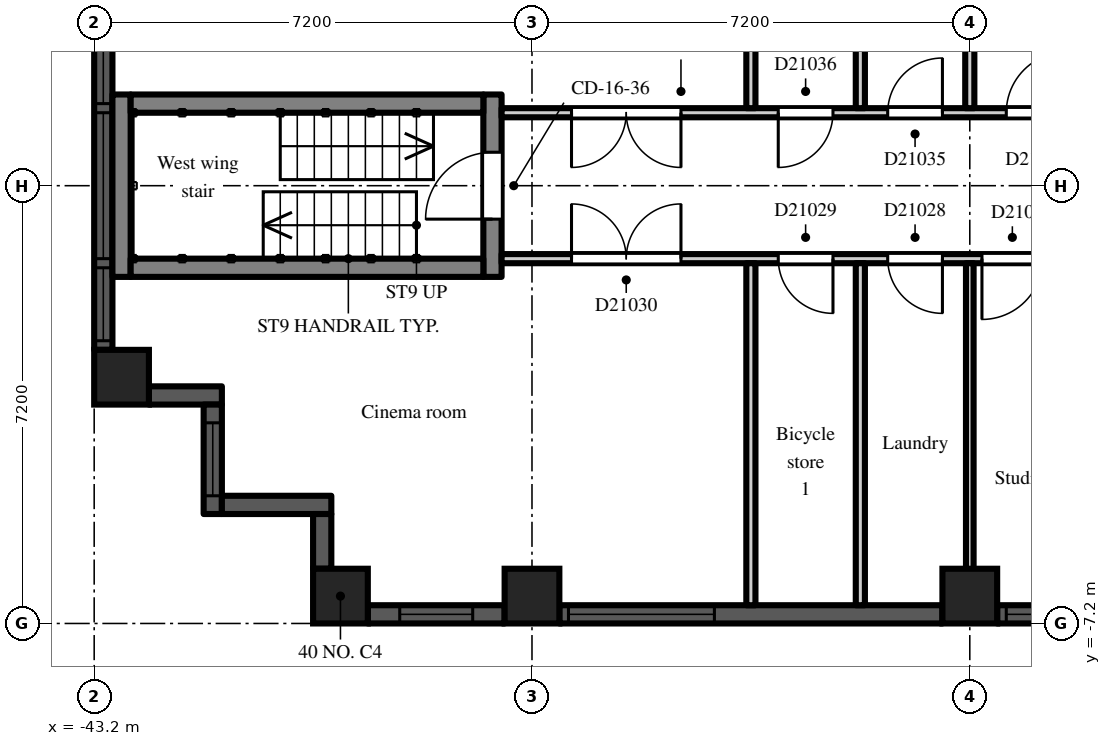
"""IFC4 building model, lengths in metres.
Left out: names, types, materials, properties, quantities, classifications, styles, units other than length and angle.
Written with IfcOpenShell. Run it as: python <this file> out.ifc"""

import sys

from ifc_helpers import new_model, si_unit, direction, frame, frame_2d, origin, origin_2d, place, context, subcontext, project, spatial, rectangle, extrude, element, fill, save


model = new_model("IFC4")
c1 = context("Model", 3, precision=1e-05, world=origin(), true_north=direction((0.0, 1.0)))
c2 = subcontext(c1, "Body", "Model", "MODEL_VIEW")
j1 = project(units=[si_unit("LENGTHUNIT", "METRE"), si_unit("PLANEANGLEUNIT", "RADIAN")], contexts=[c1])
p1 = place(None, origin())
s1 = spatial("IfcSite", under=j1, at=p1, CompositionType="ELEMENT")
p2 = place(p1, origin())
s2 = spatial("IfcBuilding", under=s1, at=p2, CompositionType="ELEMENT")
p3 = place(p2, frame((0.0, 0.0, 147.3)))
s3 = spatial("IfcBuildingStorey", under=s2, at=p3, CompositionType="ELEMENT", Elevation=147.3)
for number, where, z_axis, x_axis in (
    (1, (-42.75, -3.15, 0.0), (0.0, 0.0, 1.0), (1.0, 0.0, 0.0)),
    (2, (-39.15, -6.75, 0.0), (0.0, 0.0, 1.0), (1.0, 0.0, 0.0)),
    (3, (-36.0, -6.75, 0.0), (0.0, 0.0, 1.0), (1.0, 0.0, 0.0)),
    (4, (-28.8, -6.75, 0.0), (0.0, 0.0, 1.0), (1.0, 0.0, 0.0)),
):
    element("IfcColumn", number, at=place(p3, frame(where, z_axis=z_axis, x_axis=x_axis)), inside=s3, PredefinedType="COLUMN", context=c2, shape_type="SweptSolid", body=[
        extrude(rectangle(XDim=0.9, YDim=0.9, at=origin_2d()), origin(), (0.0, 0.0, 1.0), 3.0),
    ])
p4 = place(p3, frame((-43.05, 2.7, 0.0), z_axis=(0.0, 0.0, 1.0), x_axis=(0.0, -1.0, 0.0)))
e5 = element("IfcWall", 5, at=p4, inside=s3, PredefinedType="SOLIDWALL", context=c2, shape_type="SweptSolid", body=[
    extrude(rectangle(XDim=5.4, YDim=0.3, at=frame_2d((2.7, 0.0))), origin(), (0.0, 0.0, 1.0), 2.2),
])
p5 = place(p4, frame((1.5, 0.0, 0.2)))
e6 = element("IfcOpeningElement", 6, at=p5, cuts=e5, PredefinedType="OPENING", context=c2, shape_type="SweptSolid", body=[
    extrude(rectangle(XDim=2.4, YDim=1.85, at=frame_2d((1.2, 0.925))), frame((0.0, 0.16, 0.0), z_axis=(0.0, -1.0, 0.0), x_axis=(1.0, 0.0, 0.0)), (0.0, 0.0, 1.0), 0.32),
])
p6 = place(p4, frame((0.15, 0.0, 0.2)))
e7 = element("IfcOpeningElement", 7, at=p6, cuts=e5, PredefinedType="OPENING", context=c2, shape_type="SweptSolid", body=[
    extrude(rectangle(XDim=1.2, YDim=1.85, at=frame_2d((0.6, 0.925))), frame((0.0, 0.16, 0.0), z_axis=(0.0, -1.0, 0.0), x_axis=(1.0, 0.0, 0.0)), (0.0, 0.0, 1.0), 0.32),
])
p7 = place(p4, frame((4.05, 0.0, 0.2)))
e8 = element("IfcOpeningElement", 8, at=p7, cuts=e5, PredefinedType="OPENING", context=c2, shape_type="SweptSolid", body=[
    extrude(rectangle(XDim=1.2, YDim=1.85, at=frame_2d((0.6, 0.925))), frame((0.0, 0.16, 0.0), z_axis=(0.0, -1.0, 0.0), x_axis=(1.0, 0.0, 0.0)), (0.0, 0.0, 1.0), 0.32),
])
p8 = place(p3, frame((-42.3, -3.45, 0.0), z_axis=(0.0, 0.0, 1.0), x_axis=(1.0, 0.0, 0.0)))
e9 = element("IfcWall", 9, at=p8, inside=s3, PredefinedType="SOLIDWALL", context=c2, shape_type="SweptSolid", body=[
    extrude(rectangle(XDim=1.2, YDim=0.3, at=frame_2d((0.6, 0.0))), origin(), (0.0, 0.0, 1.0), 2.6),
])
p9 = place(p3, frame((-41.25, -3.6, 0.0), z_axis=(0.0, 0.0, 1.0), x_axis=(0.0, -1.0, 0.0)))
e10 = element("IfcWall", 10, at=p9, inside=s3, PredefinedType="SOLIDWALL", context=c2, shape_type="SweptSolid", body=[
    extrude(rectangle(XDim=1.8, YDim=0.3, at=frame_2d((0.9, 0.0))), origin(), (0.0, 0.0, 1.0), 2.6),
])
p10 = place(p9, frame((0.3, 0.0, 0.2)))
e11 = element("IfcOpeningElement", 11, at=p10, cuts=e10, PredefinedType="OPENING", context=c2, shape_type="SweptSolid", body=[
    extrude(rectangle(XDim=1.2, YDim=1.85, at=frame_2d((0.6, 0.925))), frame((0.0, 0.16, 0.0), z_axis=(0.0, -1.0, 0.0), x_axis=(1.0, 0.0, 0.0)), (0.0, 0.0, 1.0), 0.32),
])
p11 = place(p3, frame((-41.1, -5.25, 0.0), z_axis=(0.0, 0.0, 1.0), x_axis=(1.0, 0.0, 0.0)))
e12 = element("IfcWall", 12, at=p11, inside=s3, PredefinedType="SOLIDWALL", context=c2, shape_type="SweptSolid", body=[
    extrude(rectangle(XDim=1.8, YDim=0.3, at=frame_2d((0.9, 0.0))), origin(), (0.0, 0.0, 1.0), 2.6),
])
p12 = place(p3, frame((-39.45, -5.4, 0.0), z_axis=(0.0, 0.0, 1.0), x_axis=(0.0, -1.0, 0.0)))
e13 = element("IfcWall", 13, at=p12, inside=s3, PredefinedType="SOLIDWALL", context=c2, shape_type="SweptSolid", body=[
    extrude(rectangle(XDim=0.9, YDim=0.3, at=frame_2d((0.45, 0.0))), origin(), (0.0, 0.0, 1.0), 2.6),
])
p13 = place(p3, frame((-38.7, -7.05, 0.0), z_axis=(0.0, 0.0, 1.0), x_axis=(1.0, 0.0, 0.0)))
e14 = element("IfcWall", 14, at=p13, inside=s3, PredefinedType="SOLIDWALL", context=c2, shape_type="SweptSolid", body=[
    extrude(rectangle(XDim=2.25, YDim=0.3, at=frame_2d((1.125, 0.0))), origin(), (0.0, 0.0, 1.0), 2.2),
])
p14 = place(p13, frame((0.525, 0.0, 0.2)))
e15 = element("IfcOpeningElement", 15, at=p14, cuts=e14, PredefinedType="OPENING", context=c2, shape_type="SweptSolid", body=[
    extrude(rectangle(XDim=1.2, YDim=1.85, at=frame_2d((0.6, 0.925))), frame((0.0, 0.16, 0.0), z_axis=(0.0, -1.0, 0.0), x_axis=(1.0, 0.0, 0.0)), (0.0, 0.0, 1.0), 0.32),
])
p15 = place(p3, frame((-35.55, -7.05, 0.0), z_axis=(0.0, 0.0, 1.0), x_axis=(1.0, 0.0, 0.0)))
e16 = element("IfcWall", 16, at=p15, inside=s3, PredefinedType="SOLIDWALL", context=c2, shape_type="SweptSolid", body=[
    extrude(rectangle(XDim=6.3, YDim=0.3, at=frame_2d((3.15, 0.0))), origin(), (0.0, 0.0, 1.0), 2.2),
])
p16 = place(p15, frame((0.15, 0.0, 0.2)))
e17 = element("IfcOpeningElement", 17, at=p16, cuts=e16, PredefinedType="OPENING", context=c2, shape_type="SweptSolid", body=[
    extrude(rectangle(XDim=2.4, YDim=1.85, at=frame_2d((1.2, 0.925))), frame((0.0, 0.16, 0.0), z_axis=(0.0, -1.0, 0.0), x_axis=(1.0, 0.0, 0.0)), (0.0, 0.0, 1.0), 0.32),
])
p17 = place(p3, frame((-28.35, -7.05, 0.0), z_axis=(0.0, 0.0, 1.0), x_axis=(1.0, 0.0, 0.0)))
e18 = element("IfcWall", 18, at=p17, inside=s3, PredefinedType="SOLIDWALL", context=c2, shape_type="SweptSolid", body=[
    extrude(rectangle(XDim=3.15, YDim=0.3, at=frame_2d((1.575, 0.0))), origin(), (0.0, 0.0, 1.0), 2.2),
])
p18 = place(p17, frame((0.15, 0.0, 0.2)))
e19 = element("IfcOpeningElement", 19, at=p18, cuts=e18, PredefinedType="OPENING", context=c2, shape_type="SweptSolid", body=[
    extrude(rectangle(XDim=2.4, YDim=1.85, at=frame_2d((1.2, 0.925))), frame((0.0, 0.16, 0.0), z_axis=(0.0, -1.0, 0.0), x_axis=(1.0, 0.0, 0.0)), (0.0, 0.0, 1.0), 0.32),
])
p19 = place(p3, frame((-36.65, -1.5, 0.0), z_axis=(0.0, 0.0, 1.0), x_axis=(0.0, 1.0, 0.0)))
e20 = element("IfcWall", 20, at=p19, inside=s3, PredefinedType="SHEAR", context=c2, shape_type="SweptSolid", body=[
    extrude(rectangle(XDim=3.0, YDim=0.3, at=frame_2d((1.5, 0.0))), origin(), (0.0, 0.0, 1.0), 2.6),
])
p20 = place(p19, frame((0.95, 0.0, 0.0)))
e21 = element("IfcOpeningElement", 21, at=p20, cuts=e20, PredefinedType="OPENING", context=c2, shape_type="SweptSolid", body=[
    extrude(rectangle(XDim=1.1, YDim=2.1, at=frame_2d((0.55, 1.05))), frame((0.0, 0.16, 0.0), z_axis=(0.0, -1.0, 0.0), x_axis=(1.0, 0.0, 0.0)), (0.0, 0.0, 1.0), 0.32),
])
p21 = place(p3, frame((-42.75, -1.5, 0.0), z_axis=(0.0, 0.0, 1.0), x_axis=(0.0, 1.0, 0.0)))
e22 = element("IfcWall", 22, at=p21, inside=s3, PredefinedType="SHEAR", context=c2, shape_type="SweptSolid", body=[
    extrude(rectangle(XDim=3.0, YDim=0.3, at=frame_2d((1.5, 0.0))), origin(), (0.0, 0.0, 1.0), 2.6),
])
for number, where, z_axis, x_axis in (
    (23, (-36.8, -1.35, 0.0), (0.0, 0.0, 1.0), (-1.0, 0.0, 0.0)),
    (24, (-36.8, 1.35, 0.0), (0.0, 0.0, 1.0), (-1.0, 0.0, 0.0)),
):
    element("IfcWall", number, at=place(p3, frame(where, z_axis=z_axis, x_axis=x_axis)), inside=s3, PredefinedType="SHEAR", context=c2, shape_type="SweptSolid", body=[
        extrude(rectangle(XDim=5.8, YDim=0.3, at=frame_2d((2.9, 0.0))), origin(), (0.0, 0.0, 1.0), 2.6),
    ])
p22 = place(p3, frame((-36.5, -1.2, 0.0), z_axis=(0.0, 0.0, 1.0), x_axis=(1.0, 0.0, 0.0)))
e25 = element("IfcWall", 25, at=p22, inside=s3, PredefinedType="PARTITIONING", context=c2, shape_type="SweptSolid", body=[
    extrude(rectangle(XDim=14.9, YDim=0.15, at=frame_2d((7.45, 0.0))), origin(), (0.0, 0.0, 1.0), 2.6),
])
p23 = place(p22, frame((7.9, 0.0, 0.0)))
e26 = element("IfcOpeningElement", 26, at=p23, cuts=e25, PredefinedType="OPENING", context=c2, shape_type="SweptSolid", body=[
    extrude(rectangle(XDim=1.0, YDim=2.1, at=frame_2d((0.5, 1.05))), frame((0.0, 0.085, 0.0), z_axis=(0.0, -1.0, 0.0), x_axis=(1.0, 0.0, 0.0)), (0.0, 0.0, 1.0), 0.17),
])
p24 = place(p22, frame((6.35, 0.0, 0.0)))
e27 = element("IfcOpeningElement", 27, at=p24, cuts=e25, PredefinedType="OPENING", context=c2, shape_type="SweptSolid", body=[
    extrude(rectangle(XDim=0.9, YDim=2.1, at=frame_2d((0.45, 1.05))), frame((0.0, 0.085, 0.0), z_axis=(0.0, -1.0, 0.0), x_axis=(1.0, 0.0, 0.0)), (0.0, 0.0, 1.0), 0.17),
])
p25 = place(p22, frame((4.55, 0.0, 0.0)))
e28 = element("IfcOpeningElement", 28, at=p25, cuts=e25, PredefinedType="OPENING", context=c2, shape_type="SweptSolid", body=[
    extrude(rectangle(XDim=0.9, YDim=2.1, at=frame_2d((0.45, 1.05))), frame((0.0, 0.085, 0.0), z_axis=(0.0, -1.0, 0.0), x_axis=(1.0, 0.0, 0.0)), (0.0, 0.0, 1.0), 0.17),
])
p26 = place(p22, frame((1.15, 0.0, 0.0)))
e29 = element("IfcOpeningElement", 29, at=p26, cuts=e25, PredefinedType="OPENING", context=c2, shape_type="SweptSolid", body=[
    extrude(rectangle(XDim=1.8, YDim=2.1, at=frame_2d((0.9, 1.05))), frame((0.0, 0.085, 0.0), z_axis=(0.0, -1.0, 0.0), x_axis=(1.0, 0.0, 0.0)), (0.0, 0.0, 1.0), 0.17),
])
p27 = place(p3, frame((-36.5, 1.2, 0.0), z_axis=(0.0, 0.0, 1.0), x_axis=(1.0, 0.0, 0.0)))
e30 = element("IfcWall", 30, at=p27, inside=s3, PredefinedType="PARTITIONING", context=c2, shape_type="SweptSolid", body=[
    extrude(rectangle(XDim=14.9, YDim=0.15, at=frame_2d((7.45, 0.0))), origin(), (0.0, 0.0, 1.0), 2.6),
])
p28 = place(p27, frame((13.55, 0.0, 0.0)))
e31 = element("IfcOpeningElement", 31, at=p28, cuts=e30, PredefinedType="OPENING", context=c2, shape_type="SweptSolid", body=[
    extrude(rectangle(XDim=0.9, YDim=2.1, at=frame_2d((0.45, 1.05))), frame((0.0, 0.085, 0.0), z_axis=(0.0, -1.0, 0.0), x_axis=(1.0, 0.0, 0.0)), (0.0, 0.0, 1.0), 0.17),
])
p29 = place(p27, frame((11.75, 0.0, 0.0)))
e32 = element("IfcOpeningElement", 32, at=p29, cuts=e30, PredefinedType="OPENING", context=c2, shape_type="SweptSolid", body=[
    extrude(rectangle(XDim=0.9, YDim=2.1, at=frame_2d((0.45, 1.05))), frame((0.0, 0.085, 0.0), z_axis=(0.0, -1.0, 0.0), x_axis=(1.0, 0.0, 0.0)), (0.0, 0.0, 1.0), 0.17),
])
p30 = place(p27, frame((8.3, 0.0, 0.0)))
e33 = element("IfcOpeningElement", 33, at=p30, cuts=e30, PredefinedType="OPENING", context=c2, shape_type="SweptSolid", body=[
    extrude(rectangle(XDim=1.0, YDim=2.1, at=frame_2d((0.5, 1.05))), frame((0.0, 0.085, 0.0), z_axis=(0.0, -1.0, 0.0), x_axis=(1.0, 0.0, 0.0)), (0.0, 0.0, 1.0), 0.17),
])
p31 = place(p27, frame((6.35, 0.0, 0.0)))
e34 = element("IfcOpeningElement", 34, at=p31, cuts=e30, PredefinedType="OPENING", context=c2, shape_type="SweptSolid", body=[
    extrude(rectangle(XDim=0.9, YDim=2.1, at=frame_2d((0.45, 1.05))), frame((0.0, 0.085, 0.0), z_axis=(0.0, -1.0, 0.0), x_axis=(1.0, 0.0, 0.0)), (0.0, 0.0, 1.0), 0.17),
])
p32 = place(p27, frame((4.55, 0.0, 0.0)))
e35 = element("IfcOpeningElement", 35, at=p32, cuts=e30, PredefinedType="OPENING", context=c2, shape_type="SweptSolid", body=[
    extrude(rectangle(XDim=0.9, YDim=2.1, at=frame_2d((0.45, 1.05))), frame((0.0, 0.085, 0.0), z_axis=(0.0, -1.0, 0.0), x_axis=(1.0, 0.0, 0.0)), (0.0, 0.0, 1.0), 0.17),
])
p33 = place(p27, frame((1.15, 0.0, 0.0)))
e36 = element("IfcOpeningElement", 36, at=p33, cuts=e30, PredefinedType="OPENING", context=c2, shape_type="SweptSolid", body=[
    extrude(rectangle(XDim=1.8, YDim=2.1, at=frame_2d((0.9, 1.05))), frame((0.0, 0.085, 0.0), z_axis=(0.0, -1.0, 0.0), x_axis=(1.0, 0.0, 0.0)), (0.0, 0.0, 1.0), 0.17),
])
for number, where, z_axis, x_axis in (
    (37, (-32.4, -6.9, 0.0), (0.0, 0.0, 1.0), (0.0, 1.0, 0.0)),
    (38, (-32.4, 1.275, 0.0), (0.0, 0.0, 1.0), (0.0, 1.0, 0.0)),
    (39, (-30.6, -6.9, 0.0), (0.0, 0.0, 1.0), (0.0, 1.0, 0.0)),
    (40, (-30.6, 1.275, 0.0), (0.0, 0.0, 1.0), (0.0, 1.0, 0.0)),
):
    element("IfcWall", number, at=place(p3, frame(where, z_axis=z_axis, x_axis=x_axis)), inside=s3, PredefinedType="PARTITIONING", context=c2, shape_type="SweptSolid", body=[
        extrude(rectangle(XDim=5.625, YDim=0.15, at=frame_2d((2.812, 0.0))), origin(), (0.0, 0.0, 1.0), 2.6),
    ])
p34 = place(p3, frame((-28.8, -6.9, 0.0), z_axis=(0.0, 0.0, 1.0), x_axis=(0.0, 1.0, 0.0)))
e41 = element("IfcWall", 41, at=p34, inside=s3, PredefinedType="PARTITIONING", context=c2, shape_type="SweptSolid", body=[
    extrude(rectangle(XDim=5.625, YDim=0.125, at=frame_2d((2.812, 0.0))), origin(), (0.0, 0.0, 1.0), 2.6),
])
p35 = place(p3, frame((-28.8, 1.275, 0.0), z_axis=(0.0, 0.0, 1.0), x_axis=(0.0, 1.0, 0.0)))
e42 = element("IfcWall", 42, at=p35, inside=s3, PredefinedType="PARTITIONING", context=c2, shape_type="SweptSolid", body=[
    extrude(rectangle(XDim=5.625, YDim=0.15, at=frame_2d((2.812, 0.0))), origin(), (0.0, 0.0, 1.0), 2.6),
])
p36 = place(p5, origin())
e43 = element("IfcWindow", 43, at=p36, inside=s3, PartitioningType="SINGLE_PANEL", PredefinedType="WINDOW", context=c2, shape_type="SweptSolid", body=[
    extrude(rectangle(XDim=2.4, YDim=1.85, at=frame_2d((1.2, 0.925))), frame((0.0, 0.03, 0.0), z_axis=(0.0, -1.0, 0.0), x_axis=(1.0, 0.0, 0.0)), (0.0, 0.0, 1.0), 0.06),
])
fill(e6, e43)
p37 = place(p6, origin())
e44 = element("IfcWindow", 44, at=p37, inside=s3, PartitioningType="SINGLE_PANEL", PredefinedType="WINDOW", context=c2, shape_type="SweptSolid", body=[
    extrude(rectangle(XDim=1.2, YDim=1.85, at=frame_2d((0.6, 0.925))), frame((0.0, 0.03, 0.0), z_axis=(0.0, -1.0, 0.0), x_axis=(1.0, 0.0, 0.0)), (0.0, 0.0, 1.0), 0.06),
])
fill(e7, e44)
p38 = place(p7, origin())
e45 = element("IfcWindow", 45, at=p38, inside=s3, PartitioningType="SINGLE_PANEL", PredefinedType="WINDOW", context=c2, shape_type="SweptSolid", body=[
    extrude(rectangle(XDim=1.2, YDim=1.85, at=frame_2d((0.6, 0.925))), frame((0.0, 0.03, 0.0), z_axis=(0.0, -1.0, 0.0), x_axis=(1.0, 0.0, 0.0)), (0.0, 0.0, 1.0), 0.06),
])
fill(e8, e45)
p39 = place(p10, origin())
e46 = element("IfcWindow", 46, at=p39, inside=s3, PartitioningType="SINGLE_PANEL", PredefinedType="WINDOW", context=c2, shape_type="SweptSolid", body=[
    extrude(rectangle(XDim=1.2, YDim=1.85, at=frame_2d((0.6, 0.925))), frame((0.0, 0.03, 0.0), z_axis=(0.0, -1.0, 0.0), x_axis=(1.0, 0.0, 0.0)), (0.0, 0.0, 1.0), 0.06),
])
fill(e11, e46)
p40 = place(p14, origin())
e47 = element("IfcWindow", 47, at=p40, inside=s3, PartitioningType="SINGLE_PANEL", PredefinedType="WINDOW", context=c2, shape_type="SweptSolid", body=[
    extrude(rectangle(XDim=1.2, YDim=1.85, at=frame_2d((0.6, 0.925))), frame((0.0, 0.03, 0.0), z_axis=(0.0, -1.0, 0.0), x_axis=(1.0, 0.0, 0.0)), (0.0, 0.0, 1.0), 0.06),
])
fill(e15, e47)
p41 = place(p16, origin())
e48 = element("IfcWindow", 48, at=p41, inside=s3, PartitioningType="SINGLE_PANEL", PredefinedType="WINDOW", context=c2, shape_type="SweptSolid", body=[
    extrude(rectangle(XDim=2.4, YDim=1.85, at=frame_2d((1.2, 0.925))), frame((0.0, 0.03, 0.0), z_axis=(0.0, -1.0, 0.0), x_axis=(1.0, 0.0, 0.0)), (0.0, 0.0, 1.0), 0.06),
])
fill(e17, e48)
p42 = place(p18, origin())
e49 = element("IfcWindow", 49, at=p42, inside=s3, PartitioningType="SINGLE_PANEL", PredefinedType="WINDOW", context=c2, shape_type="SweptSolid", body=[
    extrude(rectangle(XDim=2.4, YDim=1.85, at=frame_2d((1.2, 0.925))), frame((0.0, 0.03, 0.0), z_axis=(0.0, -1.0, 0.0), x_axis=(1.0, 0.0, 0.0)), (0.0, 0.0, 1.0), 0.06),
])
fill(e19, e49)
p43 = place(p20, origin())
e50 = element("IfcDoor", 50, at=p43, inside=s3, OperationType="SINGLE_SWING_LEFT", PredefinedType="DOOR", context=c2, shape_type="SweptSolid", body=[
    extrude(rectangle(XDim=1.1, YDim=2.1, at=frame_2d((0.55, 1.05))), frame((0.0, 0.025, 0.0), z_axis=(0.0, -1.0, 0.0), x_axis=(1.0, 0.0, 0.0)), (0.0, 0.0, 1.0), 0.05),
])
fill(e21, e50)
p44 = place(p23, frame((1.0, 0.0, 0.0), z_axis=(0.0, 0.0, 1.0), x_axis=(-1.0, 0.0, 0.0)))
e51 = element("IfcDoor", 51, at=p44, inside=s3, OperationType="SINGLE_SWING_RIGHT", PredefinedType="DOOR", context=c2, shape_type="SweptSolid", body=[
    extrude(rectangle(XDim=1.0, YDim=2.1, at=frame_2d((0.5, 1.05))), frame((0.0, 0.025, 0.0), z_axis=(0.0, -1.0, 0.0), x_axis=(1.0, 0.0, 0.0)), (0.0, 0.0, 1.0), 0.05),
])
fill(e26, e51)
p45 = place(p24, frame((0.9, 0.0, 0.0), z_axis=(0.0, 0.0, 1.0), x_axis=(-1.0, 0.0, 0.0)))
e52 = element("IfcDoor", 52, at=p45, inside=s3, OperationType="SINGLE_SWING_LEFT", PredefinedType="DOOR", context=c2, shape_type="SweptSolid", body=[
    extrude(rectangle(XDim=0.9, YDim=2.1, at=frame_2d((0.45, 1.05))), frame((0.0, 0.025, 0.0), z_axis=(0.0, -1.0, 0.0), x_axis=(1.0, 0.0, 0.0)), (0.0, 0.0, 1.0), 0.05),
])
fill(e27, e52)
p46 = place(p25, frame((0.9, 0.0, 0.0), z_axis=(0.0, 0.0, 1.0), x_axis=(-1.0, 0.0, 0.0)))
e53 = element("IfcDoor", 53, at=p46, inside=s3, OperationType="SINGLE_SWING_LEFT", PredefinedType="DOOR", context=c2, shape_type="SweptSolid", body=[
    extrude(rectangle(XDim=0.9, YDim=2.1, at=frame_2d((0.45, 1.05))), frame((0.0, 0.025, 0.0), z_axis=(0.0, -1.0, 0.0), x_axis=(1.0, 0.0, 0.0)), (0.0, 0.0, 1.0), 0.05),
])
fill(e28, e53)
p47 = place(p26, origin())
e54 = element("IfcDoor", 54, at=p47, inside=s3, OperationType="DOUBLE_DOOR_DOUBLE_SWING", PredefinedType="DOOR", context=c2, shape_type="SweptSolid", body=[
    extrude(rectangle(XDim=1.8, YDim=2.1, at=frame_2d((0.9, 1.05))), frame((0.0, 0.025, 0.0), z_axis=(0.0, -1.0, 0.0), x_axis=(1.0, 0.0, 0.0)), (0.0, 0.0, 1.0), 0.05),
])
fill(e29, e54)
p48 = place(p30, origin())
e55 = element("IfcDoor", 55, at=p48, inside=s3, OperationType="SINGLE_SWING_RIGHT", PredefinedType="DOOR", context=c2, shape_type="SweptSolid", body=[
    extrude(rectangle(XDim=1.0, YDim=2.1, at=frame_2d((0.5, 1.05))), frame((0.0, 0.025, 0.0), z_axis=(0.0, -1.0, 0.0), x_axis=(1.0, 0.0, 0.0)), (0.0, 0.0, 1.0), 0.05),
])
fill(e33, e55)
p49 = place(p31, origin())
e56 = element("IfcDoor", 56, at=p49, inside=s3, OperationType="SINGLE_SWING_RIGHT", PredefinedType="DOOR", context=c2, shape_type="SweptSolid", body=[
    extrude(rectangle(XDim=0.9, YDim=2.1, at=frame_2d((0.45, 1.05))), frame((0.0, 0.025, 0.0), z_axis=(0.0, -1.0, 0.0), x_axis=(1.0, 0.0, 0.0)), (0.0, 0.0, 1.0), 0.05),
])
fill(e34, e56)
p50 = place(p32, frame((0.9, 0.0, 0.0), z_axis=(0.0, 0.0, 1.0), x_axis=(-1.0, 0.0, 0.0)))
e57 = element("IfcDoor", 57, at=p50, inside=s3, OperationType="SINGLE_SWING_RIGHT", PredefinedType="DOOR", context=c2, shape_type="SweptSolid", body=[
    extrude(rectangle(XDim=0.9, YDim=2.1, at=frame_2d((0.45, 1.05))), frame((0.0, 0.025, 0.0), z_axis=(0.0, -1.0, 0.0), x_axis=(1.0, 0.0, 0.0)), (0.0, 0.0, 1.0), 0.05),
])
fill(e35, e57)
p51 = place(p33, frame((1.8, 0.0, 0.0), z_axis=(0.0, 0.0, 1.0), x_axis=(-1.0, 0.0, 0.0)))
e58 = element("IfcDoor", 58, at=p51, inside=s3, OperationType="DOUBLE_DOOR_DOUBLE_SWING", PredefinedType="DOOR", context=c2, shape_type="SweptSolid", body=[
    extrude(rectangle(XDim=1.8, YDim=2.1, at=frame_2d((0.9, 1.05))), frame((0.0, 0.025, 0.0), z_axis=(0.0, -1.0, 0.0), x_axis=(1.0, 0.0, 0.0)), (0.0, 0.0, 1.0), 0.05),
])
fill(e36, e58)
save(model, sys.argv[1])
